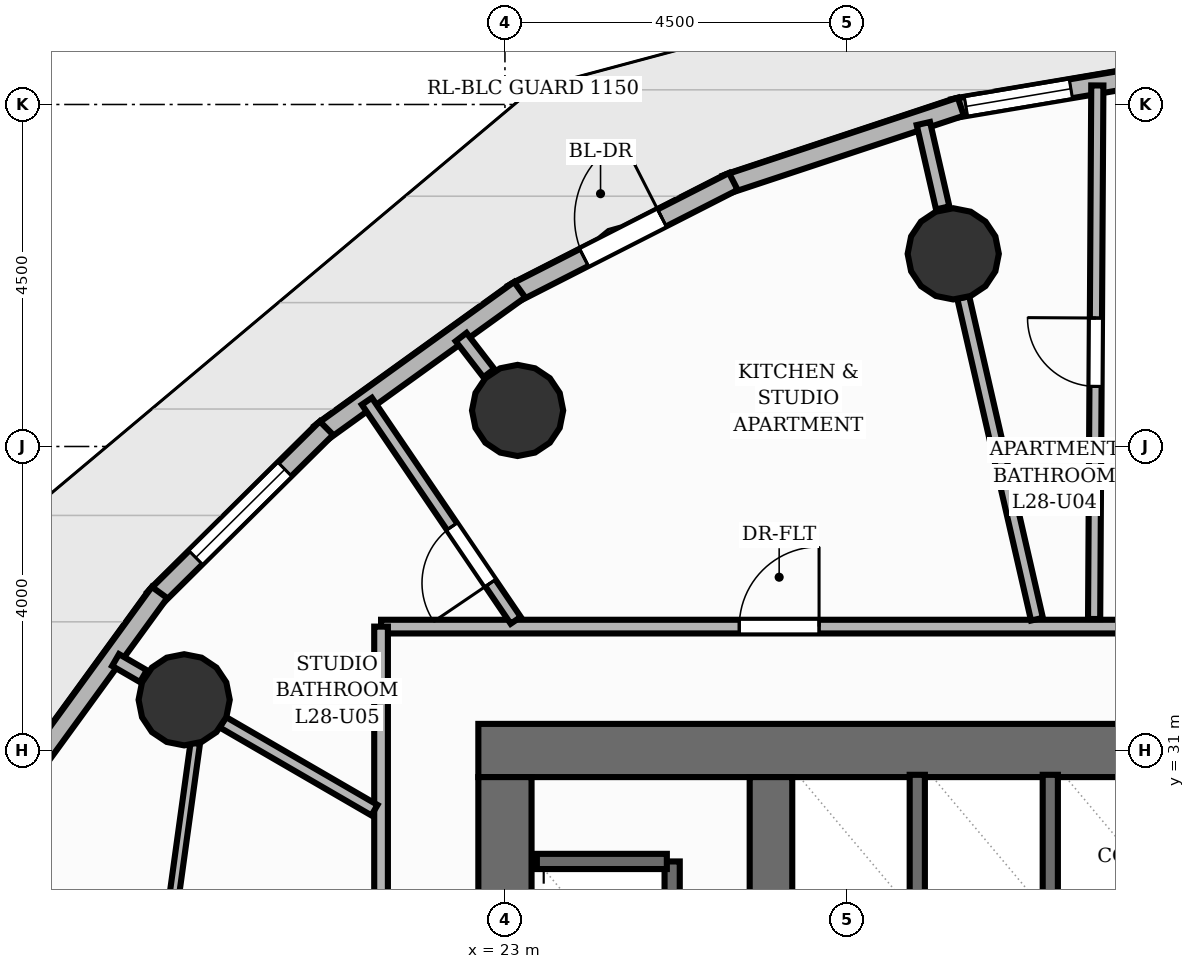
"""IFC4 building model, lengths in metres.
Left out: names, types, materials, properties, quantities, classifications, styles, units other than length and angle.
Written with IfcOpenShell. Run it as: python <this file> out.ifc"""

import sys

from ifc_helpers import new_model, si_unit, direction, frame, frame_2d, origin, origin_2d, place, context, subcontext, project, spatial, rectangle, circle, extrude, element, fill, save


model = new_model("IFC4")
c1 = context("Model", 3, precision=1e-05, world=origin(), true_north=direction((0.0, 1.0)))
c2 = subcontext(c1, "Body", "Model", "MODEL_VIEW")
j1 = project(units=[si_unit("LENGTHUNIT", "METRE"), si_unit("PLANEANGLEUNIT", "RADIAN")], contexts=[c1])
p1 = place(None, origin())
s1 = spatial("IfcSite", under=j1, at=p1, CompositionType="ELEMENT")
p2 = place(p1, origin())
s2 = spatial("IfcBuilding", under=s1, at=p2, CompositionType="ELEMENT")
p3 = place(p2, frame((0.0, 0.0, 96.48)))
s3 = spatial("IfcBuildingStorey", under=s2, at=p3, CompositionType="ELEMENT", Elevation=96.48)
p4 = place(p3, frame((22.65, 31.0, 0.0), z_axis=(0.0, 0.0, 1.0), x_axis=(1.0, 0.0, 0.0)))
e1 = element("IfcWall", 1, at=p4, inside=s3, PredefinedType="SHEAR", context=c2, shape_type="SweptSolid", body=[
    extrude(rectangle(XDim=18.7, YDim=0.7, at=frame_2d((9.35, 0.0))), origin(), (0.0, 0.0, 1.0), 3.2),
])
p5 = place(p4, frame((11.75, 0.0, 0.0)))
e2 = element("IfcOpeningElement", 2, at=p5, cuts=e1, PredefinedType="OPENING", context=c2, shape_type="SweptSolid", body=[
    extrude(rectangle(XDim=1.1, YDim=2.15, at=frame_2d((0.55, 1.075))), frame((0.0, 0.36, 0.0), z_axis=(0.0, -1.0, 0.0), x_axis=(1.0, 0.0, 0.0)), (0.0, 0.0, 1.0), 0.72),
])
p6 = place(p3, frame((23.0, 17.35, 0.0), z_axis=(0.0, 0.0, 1.0), x_axis=(0.0, 1.0, 0.0)))
e3 = element("IfcWall", 3, at=p6, inside=s3, PredefinedType="SHEAR", context=c2, shape_type="SweptSolid", body=[
    extrude(rectangle(XDim=13.3, YDim=0.7, at=frame_2d((6.65, 0.0))), origin(), (0.0, 0.0, 1.0), 3.2),
])
p7 = place(p3, frame((26.5, 17.35, 0.0), z_axis=(0.0, 0.0, 1.0), x_axis=(0.0, 1.0, 0.0)))
e4 = element("IfcWall", 4, at=p7, inside=s3, PredefinedType="SHEAR", context=c2, shape_type="SweptSolid", body=[
    extrude(rectangle(XDim=13.3, YDim=0.56, at=frame_2d((6.65, 0.0))), origin(), (0.0, 0.0, 1.0), 3.2),
])
for number, where, z_axis, x_axis in (
    (5, (28.898, 37.535, 0.0), (0.0, 0.0, 1.0), (1.0, 0.0, 0.0)),
    (6, (23.167, 35.474, 0.0), (0.0, 0.0, 1.0), (1.0, 0.0, 0.0)),
    (7, (18.78, 31.667, 0.0), (0.0, 0.0, 1.0), (1.0, 0.0, 0.0)),
):
    element("IfcColumn", number, at=place(p3, frame(where, z_axis=z_axis, x_axis=x_axis)), inside=s3, PredefinedType="COLUMN", context=c2, shape_type="SweptSolid", body=[
        extrude(circle(Radius=0.6, at=origin_2d()), origin(), (0.0, 0.0, 1.0), 3.2),
    ])
p8 = place(p3, frame((28.893, 39.445, 0.0), z_axis=(0.0, 0.0, 1.0), x_axis=(0.986043062305, 0.166490478044, 0.0)))
e8 = element("IfcWall", 8, at=p8, inside=s3, PredefinedType="SOLIDWALL", context=c2, shape_type="SweptSolid", body=[
    extrude(rectangle(XDim=3.236, YDim=0.25, at=frame_2d((1.618, 0.0))), origin(), (0.0, 0.0, 1.0), 2.96),
])
p9 = place(p8, frame((0.175, 0.0, 0.85)))
e9 = element("IfcOpeningElement", 9, at=p9, cuts=e8, PredefinedType="OPENING", context=c2, shape_type="SweptSolid", body=[
    extrude(rectangle(XDim=1.4, YDim=1.55, at=frame_2d((0.7, 0.775))), frame((0.0, 0.135, 0.0), z_axis=(0.0, -1.0, 0.0), x_axis=(1.0, 0.0, 0.0)), (0.0, 0.0, 1.0), 0.27),
])
p10 = place(p3, frame((25.904, 38.445, 0.0), z_axis=(0.0, 0.0, 1.0), x_axis=(0.949206293356, 0.314654433709, 0.0)))
e10 = element("IfcWall", 10, at=p10, inside=s3, PredefinedType="SOLIDWALL", context=c2, shape_type="SweptSolid", body=[
    extrude(rectangle(XDim=3.26, YDim=0.25, at=frame_2d((1.63, 0.0))), origin(), (0.0, 0.0, 1.0), 2.96),
])
p11 = place(p3, frame((23.101, 37.006, 0.0), z_axis=(0.0, 0.0, 1.0), x_axis=(0.89081817606, 0.454359964347, 0.0)))
e11 = element("IfcWall", 11, at=p11, inside=s3, PredefinedType="SOLIDWALL", context=c2, shape_type="SweptSolid", body=[
    extrude(rectangle(XDim=3.26, YDim=0.25, at=frame_2d((1.63, 0.0))), origin(), (0.0, 0.0, 1.0), 2.96),
])
p12 = place(p11, frame((1.055, 0.0, 0.0)))
e12 = element("IfcOpeningElement", 12, at=p12, cuts=e11, PredefinedType="OPENING", context=c2, shape_type="SweptSolid", body=[
    extrude(rectangle(XDim=1.15, YDim=2.2, at=frame_2d((0.575, 1.1))), frame((0.0, 0.135, 0.0), z_axis=(0.0, -1.0, 0.0), x_axis=(1.0, 0.0, 0.0)), (0.0, 0.0, 1.0), 0.27),
])
p13 = place(p3, frame((20.568, 35.171, 0.0), z_axis=(0.0, 0.0, 1.0), x_axis=(0.81131534838, 0.584608762749, 0.0)))
e13 = element("IfcWall", 13, at=p13, inside=s3, PredefinedType="SOLIDWALL", context=c2, shape_type="SweptSolid", body=[
    extrude(rectangle(XDim=3.236, YDim=0.25, at=frame_2d((1.618, 0.0))), origin(), (0.0, 0.0, 1.0), 2.96),
])
p14 = place(p3, frame((18.384, 32.996, 0.0), z_axis=(0.0, 0.0, 1.0), x_axis=(0.710540573889, 0.703656232017, 0.0)))
e14 = element("IfcWall", 14, at=p14, inside=s3, PredefinedType="SOLIDWALL", context=c2, shape_type="SweptSolid", body=[
    extrude(rectangle(XDim=3.192, YDim=0.25, at=frame_2d((1.596, 0.0))), origin(), (0.0, 0.0, 1.0), 2.96),
])
p15 = place(p14, frame((0.771, 0.0, 0.85)))
e15 = element("IfcOpeningElement", 15, at=p15, cuts=e14, PredefinedType="OPENING", context=c2, shape_type="SweptSolid", body=[
    extrude(rectangle(XDim=1.65, YDim=1.55, at=frame_2d((0.825, 0.775))), frame((0.0, 0.135, 0.0), z_axis=(0.0, -1.0, 0.0), x_axis=(1.0, 0.0, 0.0)), (0.0, 0.0, 1.0), 0.27),
])
p16 = place(p3, frame((16.614, 30.547, 0.0), z_axis=(0.0, 0.0, 1.0), x_axis=(0.588208785685, 0.808709109905, 0.0)))
e16 = element("IfcWall", 16, at=p16, inside=s3, PredefinedType="SOLIDWALL", context=c2, shape_type="SweptSolid", body=[
    extrude(rectangle(XDim=3.131, YDim=0.25, at=frame_2d((1.565, 0.0))), origin(), (0.0, 0.0, 1.0), 2.96),
])
p17 = place(p3, frame((25.2, 18.46, 0.0), z_axis=(0.0, 0.0, 1.0), x_axis=(0.0, 1.0, 0.0)))
e17 = element("IfcWall", 17, at=p17, inside=s3, PredefinedType="SHEAR", context=c2, shape_type="SweptSolid", body=[
    extrude(rectangle(XDim=11.08, YDim=0.2, at=frame_2d((5.54, 0.0))), origin(), (0.0, 0.0, 1.0), 3.2),
])
p18 = place(p3, frame((23.42, 29.54, 0.0), z_axis=(0.0, 0.0, 1.0), x_axis=(1.0, 0.0, 0.0)))
e18 = element("IfcWall", 18, at=p18, inside=s3, PredefinedType="SHEAR", context=c2, shape_type="SweptSolid", body=[
    extrude(rectangle(XDim=1.71, YDim=0.2, at=frame_2d((0.855, 0.0))), origin(), (0.0, 0.0, 1.0), 3.2),
])
for number, where, z_axis, x_axis in (
    (19, (28.425, 29.02, 0.0), (0.0, 0.0, 1.0), (0.0, 1.0, 0.0)),
    (20, (30.175, 29.02, 0.0), (0.0, 0.0, 1.0), (0.0, 1.0, 0.0)),
):
    element("IfcWall", number, at=place(p3, frame(where, z_axis=z_axis, x_axis=x_axis)), inside=s3, PredefinedType="SHEAR", context=c2, shape_type="SweptSolid", body=[
        extrude(rectangle(XDim=1.66, YDim=0.2, at=frame_2d((0.83, 0.0))), origin(), (0.0, 0.0, 1.0), 3.2),
    ])
p19 = place(p3, frame((28.76, 38.139, 0.0), z_axis=(0.0, 0.0, 1.0), x_axis=(-0.223325248633, 0.974743983476, 0.0)))
e21 = element("IfcWall", 21, at=p19, inside=s3, PredefinedType="PARTITIONING", context=c2, shape_type="SweptSolid", body=[
    extrude(rectangle(XDim=1.139, YDim=0.18, at=frame_2d((0.57, 0.0))), origin(), (0.0, 0.0, 1.0), 2.26),
])
p20 = place(p3, frame((22.788, 35.966, 0.0), z_axis=(0.0, 0.0, 1.0), x_axis=(-0.609809319142, 0.792548165279, 0.0)))
e22 = element("IfcWall", 22, at=p20, inside=s3, PredefinedType="PARTITIONING", context=c2, shape_type="SweptSolid", body=[
    extrude(rectangle(XDim=0.599, YDim=0.18, at=frame_2d((0.299, 0.0))), origin(), (0.0, 0.0, 1.0), 2.26),
])
p21 = place(p3, frame((18.243, 31.978, 0.0), z_axis=(0.0, 0.0, 1.0), x_axis=(-0.864926134071, 0.501899175733, 0.0)))
e23 = element("IfcWall", 23, at=p21, inside=s3, PredefinedType="PARTITIONING", context=c2, shape_type="SweptSolid", body=[
    extrude(rectangle(XDim=0.424, YDim=0.18, at=frame_2d((0.212, 0.0))), origin(), (0.0, 0.0, 1.0), 2.26),
])
p22 = place(p3, frame((21.37, 32.63, 0.0), z_axis=(0.0, 0.0, 1.0), x_axis=(1.0, 0.0, 0.0)))
e24 = element("IfcWall", 24, at=p22, inside=s3, PredefinedType="PARTITIONING", context=c2, shape_type="SweptSolid", body=[
    extrude(rectangle(XDim=12.686, YDim=0.18, at=frame_2d((6.343, 0.0))), origin(), (0.0, 0.0, 1.0), 2.955),
])
p23 = place(p22, frame((10.499, 0.0, 0.0)))
e25 = element("IfcOpeningElement", 25, at=p23, cuts=e24, PredefinedType="OPENING", context=c2, shape_type="SweptSolid", body=[
    extrude(rectangle(XDim=1.05, YDim=2.15, at=frame_2d((0.525, 1.075))), frame((0.0, 0.1, 0.0), z_axis=(0.0, -1.0, 0.0), x_axis=(1.0, 0.0, 0.0)), (0.0, 0.0, 1.0), 0.2),
])
p24 = place(p22, frame((4.713, 0.0, 0.0)))
e26 = element("IfcOpeningElement", 26, at=p24, cuts=e24, PredefinedType="OPENING", context=c2, shape_type="SweptSolid", body=[
    extrude(rectangle(XDim=1.05, YDim=2.15, at=frame_2d((0.525, 1.075))), frame((0.0, 0.1, 0.0), z_axis=(0.0, -1.0, 0.0), x_axis=(1.0, 0.0, 0.0)), (0.0, 0.0, 1.0), 0.2),
])
p25 = place(p3, frame((21.37, 21.771, 0.0), z_axis=(0.0, 0.0, 1.0), x_axis=(0.0, 1.0, 0.0)))
e27 = element("IfcWall", 27, at=p25, inside=s3, PredefinedType="PARTITIONING", context=c2, shape_type="SweptSolid", body=[
    extrude(rectangle(XDim=10.859, YDim=0.18, at=frame_2d((5.43, 0.0))), origin(), (0.0, 0.0, 1.0), 2.955),
])
p26 = place(p3, frame((30.752, 32.73, 0.0), z_axis=(0.0, 0.0, 1.0), x_axis=(0.006016026892, 0.999981903546, 0.0)))
e28 = element("IfcWall", 28, at=p26, inside=s3, PredefinedType="PLUMBINGWALL", context=c2, shape_type="SweptSolid", body=[
    extrude(rectangle(XDim=7.021, YDim=0.16, at=frame_2d((3.51, 0.0))), origin(), (0.0, 0.0, 1.0), 2.955),
])
p27 = place(p26, frame((3.06, 0.0, 0.0)))
e29 = element("IfcOpeningElement", 29, at=p27, cuts=e28, PredefinedType="OPENING", context=c2, shape_type="SweptSolid", body=[
    extrude(rectangle(XDim=0.9, YDim=2.1, at=frame_2d((0.45, 1.05))), frame((0.0, 0.09, 0.0), z_axis=(0.0, -1.0, 0.0), x_axis=(1.0, 0.0, 0.0)), (0.0, 0.0, 1.0), 0.18),
])
p28 = place(p3, frame((30.0, 32.728, 0.0), z_axis=(0.0, 0.0, 1.0), x_axis=(-0.223409547543, 0.974724665773, 0.0)))
e30 = element("IfcWall", 30, at=p28, inside=s3, PredefinedType="PLUMBINGWALL", context=c2, shape_type="SweptSolid", body=[
    extrude(rectangle(XDim=4.342, YDim=0.16, at=frame_2d((2.171, 0.0))), origin(), (0.0, 0.0, 1.0), 2.26),
])
p29 = place(p3, frame((23.142, 32.713, 0.0), z_axis=(0.0, 0.0, 1.0), x_axis=(-0.561921019334, 0.827190889717, 0.0)))
e31 = element("IfcWall", 31, at=p29, inside=s3, PredefinedType="PLUMBINGWALL", context=c2, shape_type="SweptSolid", body=[
    extrude(rectangle(XDim=3.485, YDim=0.16, at=frame_2d((1.743, 0.0))), origin(), (0.0, 0.0, 1.0), 2.641),
])
p30 = place(p29, frame((0.593, 0.0, 0.0)))
e32 = element("IfcOpeningElement", 32, at=p30, cuts=e31, PredefinedType="OPENING", context=c2, shape_type="SweptSolid", body=[
    extrude(rectangle(XDim=0.9, YDim=2.1, at=frame_2d((0.45, 1.05))), frame((0.0, 0.09, 0.0), z_axis=(0.0, -1.0, 0.0), x_axis=(1.0, 0.0, 0.0)), (0.0, 0.0, 1.0), 0.18),
])
p31 = place(p3, frame((21.283, 30.215, 0.0), z_axis=(0.0, 0.0, 1.0), x_axis=(-0.865054150745, 0.501678498921, 0.0)))
e33 = element("IfcWall", 33, at=p31, inside=s3, PredefinedType="PLUMBINGWALL", context=c2, shape_type="SweptSolid", body=[
    extrude(rectangle(XDim=2.307, YDim=0.16, at=frame_2d((1.154, 0.0))), origin(), (0.0, 0.0, 1.0), 2.26),
])
p32 = place(p3, frame((17.542, 21.073, 0.0), z_axis=(0.0, 0.0, 1.0), x_axis=(0.136714950607, 0.99061042912, 0.0)))
e34 = element("IfcWall", 34, at=p32, inside=s3, PredefinedType="PARTITIONING", context=c2, shape_type="SweptSolid", body=[
    extrude(rectangle(XDim=10.12, YDim=0.125, at=frame_2d((5.06, 0.0))), origin(), (0.0, 0.0, 1.0), 2.955),
])
p33 = place(p32, frame((4.47, 0.0, 0.0)))
e35 = element("IfcOpeningElement", 35, at=p33, cuts=e34, PredefinedType="OPENING", context=c2, shape_type="SweptSolid", body=[
    extrude(rectangle(XDim=0.9, YDim=2.1, at=frame_2d((0.45, 1.05))), frame((0.0, 0.073, 0.0), z_axis=(0.0, -1.0, 0.0), x_axis=(1.0, 0.0, 0.0)), (0.0, 0.0, 1.0), 0.145),
])
p34 = place(p12, origin())
e36 = element("IfcDoor", 36, at=p34, inside=s3, OperationType="SINGLE_SWING_RIGHT", PredefinedType="DOOR", context=c2, shape_type="SweptSolid", body=[
    extrude(rectangle(XDim=1.15, YDim=2.2, at=frame_2d((0.575, 1.1))), frame((0.0, 0.025, 0.0), z_axis=(0.0, -1.0, 0.0), x_axis=(1.0, 0.0, 0.0)), (0.0, 0.0, 1.0), 0.05),
])
fill(e12, e36)
p35 = place(p9, origin())
e37 = element("IfcWindow", 37, at=p35, inside=s3, PartitioningType="SINGLE_PANEL", PredefinedType="WINDOW", context=c2, shape_type="SweptSolid", body=[
    extrude(rectangle(XDim=1.4, YDim=1.55, at=frame_2d((0.7, 0.775))), frame((0.0, 0.03, 0.0), z_axis=(0.0, -1.0, 0.0), x_axis=(1.0, 0.0, 0.0)), (0.0, 0.0, 1.0), 0.06),
])
fill(e9, e37)
p36 = place(p15, origin())
e38 = element("IfcWindow", 38, at=p36, inside=s3, PartitioningType="SINGLE_PANEL", PredefinedType="WINDOW", context=c2, shape_type="SweptSolid", body=[
    extrude(rectangle(XDim=1.65, YDim=1.55, at=frame_2d((0.825, 0.775))), frame((0.0, 0.03, 0.0), z_axis=(0.0, -1.0, 0.0), x_axis=(1.0, 0.0, 0.0)), (0.0, 0.0, 1.0), 0.06),
])
fill(e15, e38)
p37 = place(p27, origin())
e39 = element("IfcDoor", 39, at=p37, inside=s3, OperationType="SINGLE_SWING_RIGHT", PredefinedType="DOOR", context=c2, shape_type="SweptSolid", body=[
    extrude(rectangle(XDim=0.9, YDim=2.1, at=frame_2d((0.45, 1.05))), frame((0.0, 0.025, 0.0), z_axis=(0.0, -1.0, 0.0), x_axis=(1.0, 0.0, 0.0)), (0.0, 0.0, 1.0), 0.05),
])
fill(e29, e39)
p38 = place(p24, origin())
e40 = element("IfcDoor", 40, at=p38, inside=s3, OperationType="SINGLE_SWING_RIGHT", PredefinedType="DOOR", context=c2, shape_type="SweptSolid", body=[
    extrude(rectangle(XDim=1.05, YDim=2.15, at=frame_2d((0.525, 1.075))), frame((0.0, 0.025, 0.0), z_axis=(0.0, -1.0, 0.0), x_axis=(1.0, 0.0, 0.0)), (0.0, 0.0, 1.0), 0.05),
])
fill(e26, e40)
p39 = place(p30, origin())
e41 = element("IfcDoor", 41, at=p39, inside=s3, OperationType="SINGLE_SWING_LEFT", PredefinedType="DOOR", context=c2, shape_type="SweptSolid", body=[
    extrude(rectangle(XDim=0.9, YDim=2.1, at=frame_2d((0.45, 1.05))), frame((0.0, 0.025, 0.0), z_axis=(0.0, -1.0, 0.0), x_axis=(1.0, 0.0, 0.0)), (0.0, 0.0, 1.0), 0.05),
])
fill(e32, e41)
save(model, sys.argv[1])
